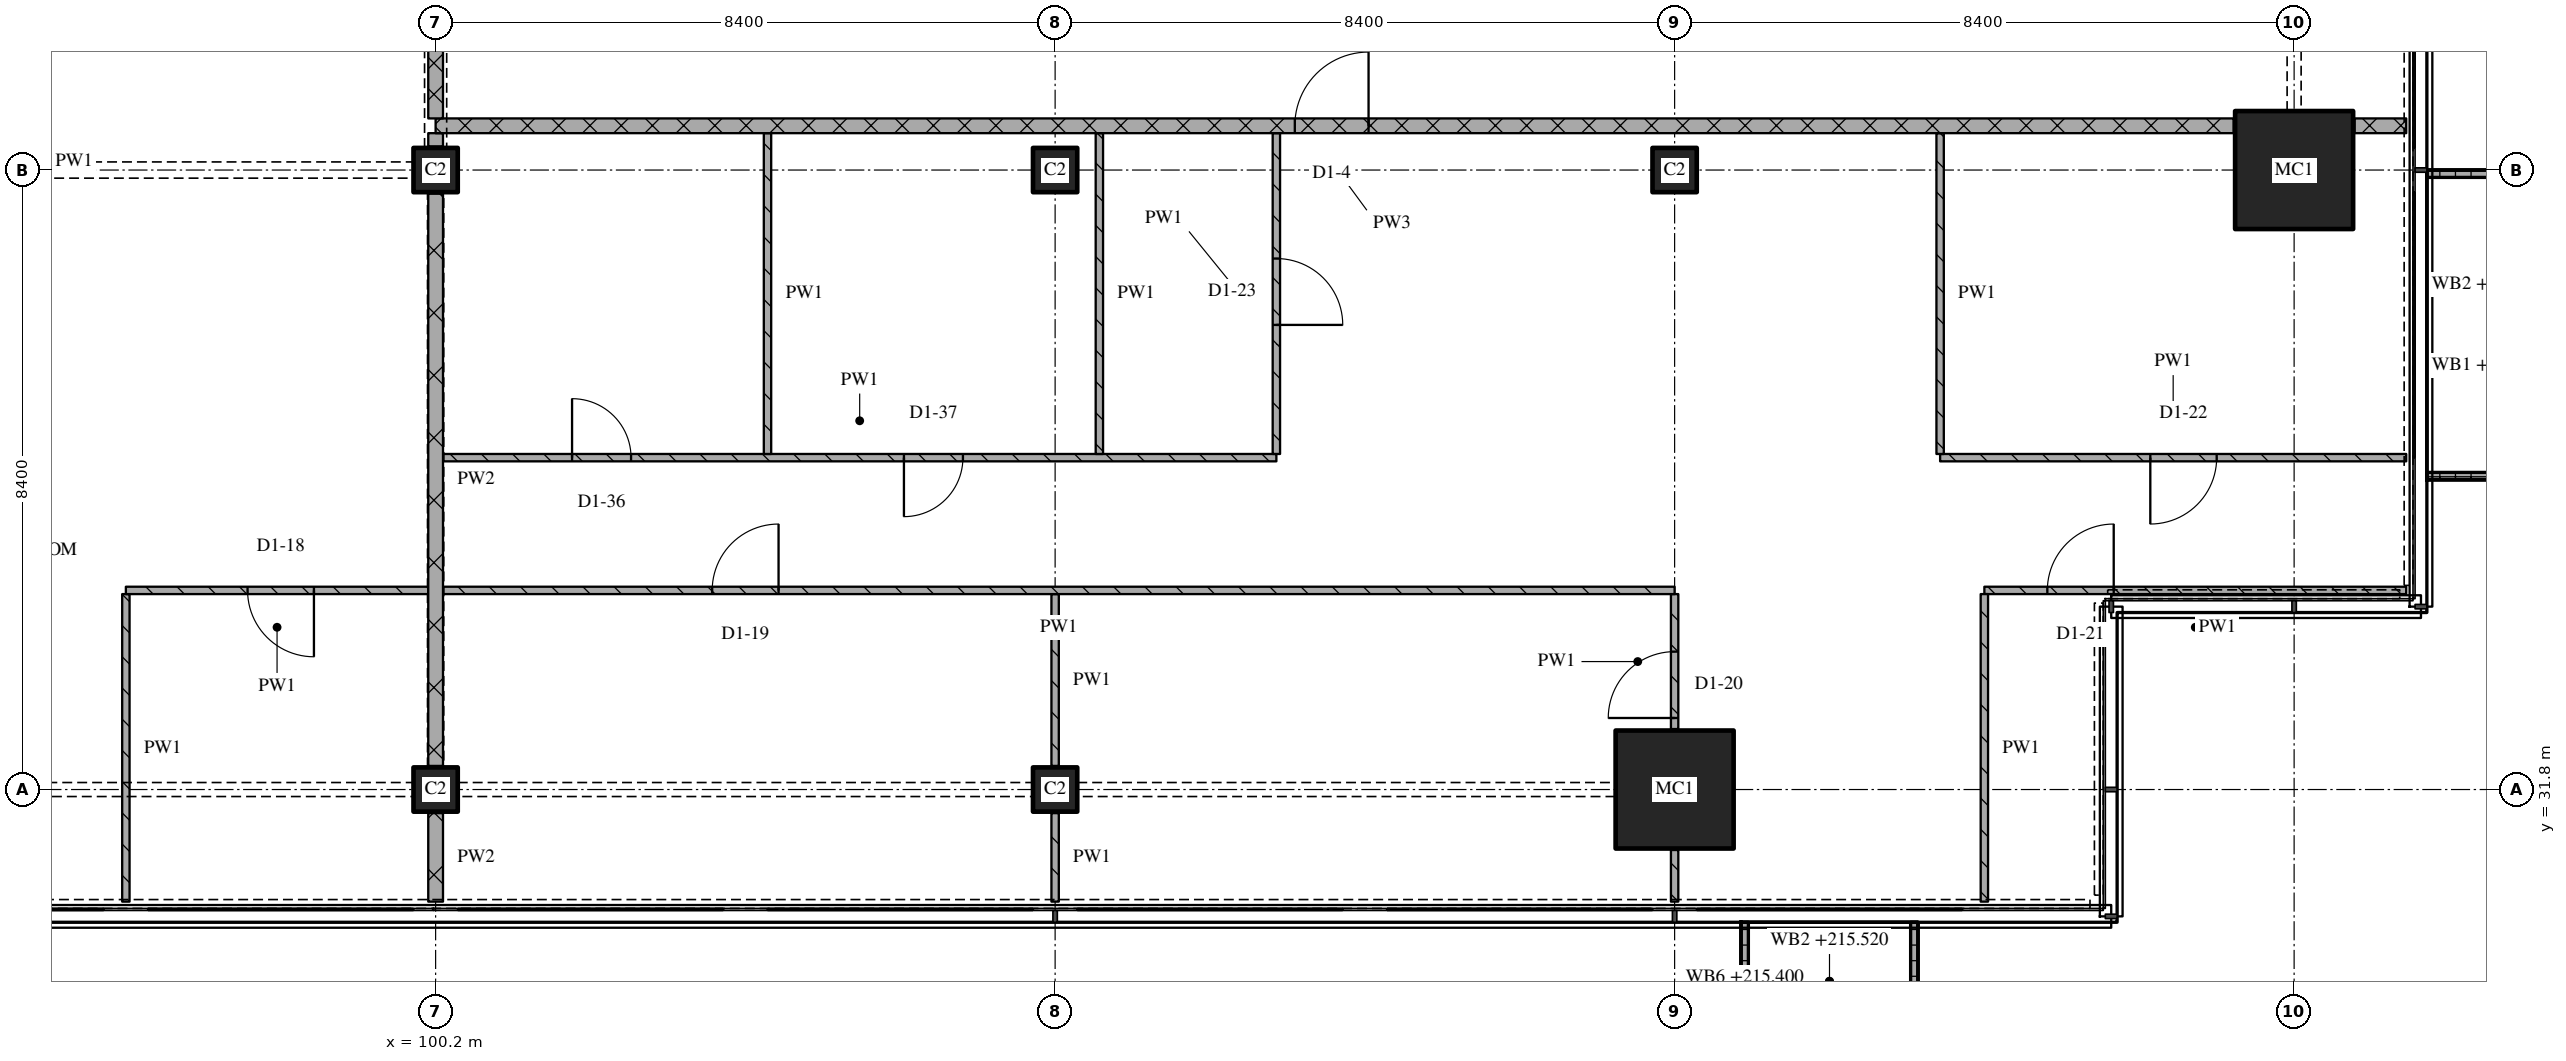
"""IFC4 building model, lengths in metres.
Left out: names, types, materials, properties, quantities, classifications, styles, units other than length and angle.
Written with IfcOpenShell. Run it as: python <this file> out.ifc"""

import sys

from ifc_helpers import new_model, si_unit, direction, frame, frame_2d, origin, origin_2d, place, context, subcontext, project, spatial, polyline, rectangle, outline, extrude, element, fill, save


model = new_model("IFC4")
c1 = context("Model", 3, precision=1e-05, world=origin(), true_north=direction((0.0, 1.0)))
c2 = subcontext(c1, "Body", "Model", "MODEL_VIEW")
j1 = project(units=[si_unit("LENGTHUNIT", "METRE"), si_unit("PLANEANGLEUNIT", "RADIAN")], contexts=[c1])
p1 = place(None, origin())
s1 = spatial("IfcSite", under=j1, at=p1, CompositionType="ELEMENT")
p2 = place(p1, origin())
s2 = spatial("IfcBuilding", under=s1, at=p2, CompositionType="ELEMENT")
p3 = place(p2, frame((0.0, 0.0, 212.7)))
s3 = spatial("IfcBuildingStorey", under=s2, at=p3, CompositionType="ELEMENT", Elevation=212.7)
for number, where, z_axis, x_axis in (
    (1, (100.2, 31.8, 0.0), (0.0, 0.0, 1.0), (1.0, 0.0, 0.0)),
    (2, (100.2, 40.2, 0.0), (0.0, 0.0, 1.0), (1.0, 0.0, 0.0)),
    (3, (108.6, 31.8, 0.0), (0.0, 0.0, 1.0), (1.0, 0.0, 0.0)),
    (4, (108.6, 40.2, 0.0), (0.0, 0.0, 1.0), (1.0, 0.0, 0.0)),
):
    element("IfcColumn", number, at=place(p3, frame(where, z_axis=z_axis, x_axis=x_axis)), inside=s3, PredefinedType="COLUMN", context=c2, shape_type="SweptSolid", body=[
        extrude(rectangle(XDim=0.6, YDim=0.6, at=origin_2d()), origin(), (0.0, 0.0, 1.0), 3.6),
    ])
p4 = place(p3, frame((117.0, 31.8, 0.0), z_axis=(0.0, 0.0, 1.0), x_axis=(1.0, 0.0, 0.0)))
e5 = element("IfcColumn", 5, at=p4, inside=s3, PredefinedType="COLUMN", context=c2, shape_type="SweptSolid", body=[
    extrude(rectangle(XDim=1.6, YDim=1.6, at=origin_2d()), origin(), (0.0, 0.0, 1.0), 3.6),
])
p5 = place(p3, frame((117.0, 40.2, 0.0), z_axis=(0.0, 0.0, 1.0), x_axis=(1.0, 0.0, 0.0)))
e6 = element("IfcColumn", 6, at=p5, inside=s3, PredefinedType="COLUMN", context=c2, shape_type="SweptSolid", body=[
    extrude(rectangle(XDim=0.6, YDim=0.6, at=origin_2d()), origin(), (0.0, 0.0, 1.0), 3.6),
])
p6 = place(p3, frame((125.4, 40.2, 0.0), z_axis=(0.0, 0.0, 1.0), x_axis=(1.0, 0.0, 0.0)))
e7 = element("IfcColumn", 7, at=p6, inside=s3, PredefinedType="COLUMN", context=c2, shape_type="SweptSolid", body=[
    extrude(rectangle(XDim=1.6, YDim=1.6, at=origin_2d()), origin(), (0.0, 0.0, 1.0), 3.6),
])
p7 = place(p3, origin())
e8 = element("IfcWall", 8, at=p7, inside=s3, PredefinedType="SOLIDWALL", context=c2, shape_type="SweptSolid", body=[
    extrude(outline(polyline([(117.9, 30.0), (118.0, 30.0), (118.0, 28.5), (120.2, 28.5), (120.2, 30.0), (120.3, 30.0), (120.3, 28.4), (117.9, 28.4), (117.9, 30.0)])), origin(), (0.0, 0.0, 1.0), 1.0),
])
p8 = place(p3, origin())
e9 = element("IfcWall", 9, at=p8, inside=s3, PredefinedType="SOLIDWALL", context=c2, shape_type="SweptSolid", body=[
    extrude(outline(polyline([(127.2, 36.0), (127.2, 36.1), (128.833, 36.1), (128.833, 40.1), (127.2, 40.1), (127.2, 40.2), (128.933, 40.2), (128.933, 36.0), (127.2, 36.0)])), origin(), (0.0, 0.0, 1.0), 1.0),
])
p9 = place(p3, frame((126.92, 34.5, 0.0), z_axis=(0.0, 0.0, 1.0), x_axis=(-1.0, 0.0, 0.0)))
e10 = element("IfcWall", 10, at=p9, inside=s3, PredefinedType="PARTITIONING", context=c2, shape_type="SweptSolid", body=[
    extrude(rectangle(XDim=5.72, YDim=0.1, at=frame_2d((2.86, 0.0))), origin(), (0.0, 0.0, 1.0), 3.32),
])
p10 = place(p9, frame((3.966, 0.0, 0.0)))
e11 = element("IfcOpeningElement", 11, at=p10, cuts=e10, PredefinedType="OPENING", context=c2, shape_type="SweptSolid", body=[
    extrude(rectangle(XDim=0.9, YDim=2.1, at=frame_2d((0.45, 1.05))), frame((0.0, 0.06, 0.0), z_axis=(0.0, -1.0, 0.0), x_axis=(1.0, 0.0, 0.0)), (0.0, 0.0, 1.0), 0.12),
])
p11 = place(p3, frame((100.3, 36.3, 0.0), z_axis=(0.0, 0.0, 1.0), x_axis=(1.0, 0.0, 0.0)))
e12 = element("IfcWall", 12, at=p11, inside=s3, PredefinedType="PARTITIONING", context=c2, shape_type="SweptSolid", body=[
    extrude(rectangle(XDim=11.3, YDim=0.1, at=frame_2d((5.65, 0.0))), origin(), (0.0, 0.0, 1.0), 3.32),
])
p12 = place(p11, frame((1.75, 0.0, 0.0)))
e13 = element("IfcOpeningElement", 13, at=p12, cuts=e12, PredefinedType="OPENING", context=c2, shape_type="SweptSolid", body=[
    extrude(rectangle(XDim=0.8, YDim=2.1, at=frame_2d((0.4, 1.05))), frame((0.0, 0.06, 0.0), z_axis=(0.0, -1.0, 0.0), x_axis=(1.0, 0.0, 0.0)), (0.0, 0.0, 1.0), 0.12),
])
p13 = place(p11, frame((6.25, 0.0, 0.0)))
e14 = element("IfcOpeningElement", 14, at=p13, cuts=e12, PredefinedType="OPENING", context=c2, shape_type="SweptSolid", body=[
    extrude(rectangle(XDim=0.8, YDim=2.1, at=frame_2d((0.4, 1.05))), frame((0.0, 0.06, 0.0), z_axis=(0.0, -1.0, 0.0), x_axis=(1.0, 0.0, 0.0)), (0.0, 0.0, 1.0), 0.12),
])
p14 = place(p3, frame((120.6, 36.3, 0.0), z_axis=(0.0, 0.0, 1.0), x_axis=(1.0, 0.0, 0.0)))
e15 = element("IfcWall", 15, at=p14, inside=s3, PredefinedType="PARTITIONING", context=c2, shape_type="SweptSolid", body=[
    extrude(rectangle(XDim=6.32, YDim=0.1, at=frame_2d((3.16, 0.0))), origin(), (0.0, 0.0, 1.0), 3.32),
])
p15 = place(p14, frame((2.85, 0.0, 0.0)))
e16 = element("IfcOpeningElement", 16, at=p15, cuts=e15, PredefinedType="OPENING", context=c2, shape_type="SweptSolid", body=[
    extrude(rectangle(XDim=0.9, YDim=2.1, at=frame_2d((0.45, 1.05))), frame((0.0, 0.06, 0.0), z_axis=(0.0, -1.0, 0.0), x_axis=(1.0, 0.0, 0.0)), (0.0, 0.0, 1.0), 0.12),
])
p16 = place(p3, frame((124.58, 40.8, 0.0), z_axis=(0.0, 0.0, 1.0), x_axis=(-1.0, 0.0, 0.0)))
e17 = element("IfcWall", 17, at=p16, inside=s3, PredefinedType="PARTITIONING", context=c2, shape_type="SweptSolid", body=[
    extrude(rectangle(XDim=24.38, YDim=0.2, at=frame_2d((12.19, 0.0))), origin(), (0.0, 0.0, 1.0), 3.32),
])
p17 = place(p16, frame((11.73, 0.0, 0.0)))
e18 = element("IfcOpeningElement", 18, at=p17, cuts=e17, PredefinedType="OPENING", context=c2, shape_type="SweptSolid", body=[
    extrude(rectangle(XDim=1.0, YDim=2.1, at=frame_2d((0.5, 1.05))), frame((0.0, 0.11, 0.0), z_axis=(0.0, -1.0, 0.0), x_axis=(1.0, 0.0, 0.0)), (0.0, 0.0, 1.0), 0.22),
])
p18 = place(p3, frame((126.22, 40.8, 0.0), z_axis=(0.0, 0.0, 1.0), x_axis=(1.0, 0.0, 0.0)))
e19 = element("IfcWall", 19, at=p18, inside=s3, PredefinedType="PARTITIONING", context=c2, shape_type="SweptSolid", body=[
    extrude(rectangle(XDim=0.7, YDim=0.2, at=frame_2d((0.35, 0.0))), origin(), (0.0, 0.0, 1.0), 3.32),
])
p19 = place(p3, frame((96.0, 34.45, 0.0), z_axis=(0.0, 0.0, 1.0), x_axis=(0.0, -1.0, 0.0)))
e20 = element("IfcWall", 20, at=p19, inside=s3, PredefinedType="PARTITIONING", context=c2, shape_type="SweptSolid", body=[
    extrude(rectangle(XDim=4.17, YDim=0.1, at=frame_2d((2.085, 0.0))), origin(), (0.0, 0.0, 1.0), 3.32),
])
p20 = place(p3, frame((100.2, 43.1, 0.0), z_axis=(0.0, 0.0, 1.0), x_axis=(0.0, -1.0, 0.0)))
e21 = element("IfcWall", 21, at=p20, inside=s3, PredefinedType="PARTITIONING", context=c2, shape_type="SweptSolid", body=[
    extrude(rectangle(XDim=2.2, YDim=0.2, at=frame_2d((1.1, 0.0))), origin(), (0.0, 0.0, 1.0), 2.53),
])
p21 = place(p3, frame((100.2, 31.48, 0.0), z_axis=(0.0, 0.0, 1.0), x_axis=(0.0, -1.0, 0.0)))
e22 = element("IfcWall", 22, at=p21, inside=s3, PredefinedType="PARTITIONING", context=c2, shape_type="SweptSolid", body=[
    extrude(rectangle(XDim=1.2, YDim=0.2, at=frame_2d((0.6, 0.0))), origin(), (0.0, 0.0, 1.0), 3.32),
])
p22 = place(p3, frame((100.2, 39.88, 0.0), z_axis=(0.0, 0.0, 1.0), x_axis=(0.0, -1.0, 0.0)))
e23 = element("IfcWall", 23, at=p22, inside=s3, PredefinedType="PARTITIONING", context=c2, shape_type="SweptSolid", body=[
    extrude(rectangle(XDim=7.76, YDim=0.2, at=frame_2d((3.88, 0.0))), origin(), (0.0, 0.0, 1.0), 2.72),
])
p23 = place(p3, frame((100.2, 40.7, 0.0), z_axis=(0.0, 0.0, 1.0), x_axis=(0.0, -1.0, 0.0)))
e24 = element("IfcWall", 24, at=p23, inside=s3, PredefinedType="PARTITIONING", context=c2, shape_type="SweptSolid", body=[
    extrude(rectangle(XDim=0.18, YDim=0.2, at=frame_2d((0.09, 0.0))), origin(), (0.0, 0.0, 1.0), 3.32),
])
p24 = place(p3, frame((104.7, 40.7, 0.0), z_axis=(0.0, 0.0, 1.0), x_axis=(0.0, -1.0, 0.0)))
e25 = element("IfcWall", 25, at=p24, inside=s3, PredefinedType="PARTITIONING", context=c2, shape_type="SweptSolid", body=[
    extrude(rectangle(XDim=4.35, YDim=0.1, at=frame_2d((2.175, 0.0))), origin(), (0.0, 0.0, 1.0), 3.32),
])
p25 = place(p3, frame((108.6, 31.48, 0.0), z_axis=(0.0, 0.0, 1.0), x_axis=(0.0, -1.0, 0.0)))
e26 = element("IfcWall", 26, at=p25, inside=s3, PredefinedType="PARTITIONING", context=c2, shape_type="SweptSolid", body=[
    extrude(rectangle(XDim=1.2, YDim=0.1, at=frame_2d((0.6, 0.0))), origin(), (0.0, 0.0, 1.0), 3.32),
])
p26 = place(p3, frame((108.6, 34.45, 0.0), z_axis=(0.0, 0.0, 1.0), x_axis=(0.0, -1.0, 0.0)))
e27 = element("IfcWall", 27, at=p26, inside=s3, PredefinedType="PARTITIONING", context=c2, shape_type="SweptSolid", body=[
    extrude(rectangle(XDim=2.33, YDim=0.1, at=frame_2d((1.165, 0.0))), origin(), (0.0, 0.0, 1.0), 3.32),
])
p27 = place(p3, frame((109.2, 40.7, 0.0), z_axis=(0.0, 0.0, 1.0), x_axis=(0.0, -1.0, 0.0)))
e28 = element("IfcWall", 28, at=p27, inside=s3, PredefinedType="PARTITIONING", context=c2, shape_type="SweptSolid", body=[
    extrude(rectangle(XDim=4.35, YDim=0.1, at=frame_2d((2.175, 0.0))), origin(), (0.0, 0.0, 1.0), 3.32),
])
p28 = place(p3, frame((111.6, 36.35, 0.0), z_axis=(0.0, 0.0, 1.0), x_axis=(0.0, 1.0, 0.0)))
e29 = element("IfcWall", 29, at=p28, inside=s3, PredefinedType="PARTITIONING", context=c2, shape_type="SweptSolid", body=[
    extrude(rectangle(XDim=4.35, YDim=0.1, at=frame_2d((2.175, 0.0))), origin(), (0.0, 0.0, 1.0), 3.32),
])
p29 = place(p28, frame((1.75, 0.0, 0.0)))
e30 = element("IfcOpeningElement", 30, at=p29, cuts=e29, PredefinedType="OPENING", context=c2, shape_type="SweptSolid", body=[
    extrude(rectangle(XDim=0.9, YDim=2.1, at=frame_2d((0.45, 1.05))), frame((0.0, 0.06, 0.0), z_axis=(0.0, -1.0, 0.0), x_axis=(1.0, 0.0, 0.0)), (0.0, 0.0, 1.0), 0.12),
])
p30 = place(p3, frame((117.0, 30.98, 0.0), z_axis=(0.0, 0.0, 1.0), x_axis=(0.0, -1.0, 0.0)))
e31 = element("IfcWall", 31, at=p30, inside=s3, PredefinedType="PARTITIONING", context=c2, shape_type="SweptSolid", body=[
    extrude(rectangle(XDim=0.7, YDim=0.1, at=frame_2d((0.35, 0.0))), origin(), (0.0, 0.0, 1.0), 3.32),
])
p31 = place(p3, frame((117.0, 32.62, 0.0), z_axis=(0.0, 0.0, 1.0), x_axis=(0.0, 1.0, 0.0)))
e32 = element("IfcWall", 32, at=p31, inside=s3, PredefinedType="PARTITIONING", context=c2, shape_type="SweptSolid", body=[
    extrude(rectangle(XDim=1.83, YDim=0.1, at=frame_2d((0.915, 0.0))), origin(), (0.0, 0.0, 1.0), 3.32),
])
p32 = place(p31, frame((0.15, 0.0, 0.0)))
e33 = element("IfcOpeningElement", 33, at=p32, cuts=e32, PredefinedType="OPENING", context=c2, shape_type="SweptSolid", body=[
    extrude(rectangle(XDim=0.9, YDim=2.1, at=frame_2d((0.45, 1.05))), frame((0.0, 0.06, 0.0), z_axis=(0.0, -1.0, 0.0), x_axis=(1.0, 0.0, 0.0)), (0.0, 0.0, 1.0), 0.12),
])
p33 = place(p3, frame((120.6, 40.7, 0.0), z_axis=(0.0, 0.0, 1.0), x_axis=(0.0, -1.0, 0.0)))
e34 = element("IfcWall", 34, at=p33, inside=s3, PredefinedType="PARTITIONING", context=c2, shape_type="SweptSolid", body=[
    extrude(rectangle(XDim=4.35, YDim=0.1, at=frame_2d((2.175, 0.0))), origin(), (0.0, 0.0, 1.0), 3.32),
])
p34 = place(p3, frame((121.2, 34.45, 0.0), z_axis=(0.0, 0.0, 1.0), x_axis=(0.0, -1.0, 0.0)))
e35 = element("IfcWall", 35, at=p34, inside=s3, PredefinedType="PARTITIONING", context=c2, shape_type="SweptSolid", body=[
    extrude(rectangle(XDim=4.17, YDim=0.1, at=frame_2d((2.085, 0.0))), origin(), (0.0, 0.0, 1.0), 3.32),
])
p35 = place(p3, frame((100.1, 34.5, 0.0), z_axis=(0.0, 0.0, 1.0), x_axis=(-1.0, 0.0, 0.0)))
e36 = element("IfcWall", 36, at=p35, inside=s3, PredefinedType="PARTITIONING", context=c2, shape_type="SweptSolid", body=[
    extrude(rectangle(XDim=4.1, YDim=0.1, at=frame_2d((2.05, 0.0))), origin(), (0.0, 0.0, 1.0), 3.32),
])
p36 = place(p35, frame((1.55, 0.0, 0.0)))
e37 = element("IfcOpeningElement", 37, at=p36, cuts=e36, PredefinedType="OPENING", context=c2, shape_type="SweptSolid", body=[
    extrude(rectangle(XDim=0.9, YDim=2.1, at=frame_2d((0.45, 1.05))), frame((0.0, 0.06, 0.0), z_axis=(0.0, -1.0, 0.0), x_axis=(1.0, 0.0, 0.0)), (0.0, 0.0, 1.0), 0.12),
])
p37 = place(p3, frame((117.0, 34.5, 0.0), z_axis=(0.0, 0.0, 1.0), x_axis=(-1.0, 0.0, 0.0)))
e38 = element("IfcWall", 38, at=p37, inside=s3, PredefinedType="PARTITIONING", context=c2, shape_type="SweptSolid", body=[
    extrude(rectangle(XDim=16.7, YDim=0.1, at=frame_2d((8.35, 0.0))), origin(), (0.0, 0.0, 1.0), 3.32),
])
p38 = place(p37, frame((12.15, 0.0, 0.0)))
e39 = element("IfcOpeningElement", 39, at=p38, cuts=e38, PredefinedType="OPENING", context=c2, shape_type="SweptSolid", body=[
    extrude(rectangle(XDim=0.9, YDim=2.1, at=frame_2d((0.45, 1.05))), frame((0.0, 0.06, 0.0), z_axis=(0.0, -1.0, 0.0), x_axis=(1.0, 0.0, 0.0)), (0.0, 0.0, 1.0), 0.12),
])
p39 = place(p10, origin())
e40 = element("IfcDoor", 40, at=p39, inside=s3, OperationType="SINGLE_SWING_RIGHT", PredefinedType="DOOR", context=c2, shape_type="SweptSolid", body=[
    extrude(rectangle(XDim=0.9, YDim=2.1, at=frame_2d((0.45, 1.05))), frame((0.0, 0.025, 0.0), z_axis=(0.0, -1.0, 0.0), x_axis=(1.0, 0.0, 0.0)), (0.0, 0.0, 1.0), 0.05),
])
fill(e11, e40)
p40 = place(p12, origin())
e41 = element("IfcDoor", 41, at=p40, inside=s3, OperationType="SINGLE_SWING_LEFT", PredefinedType="DOOR", context=c2, shape_type="SweptSolid", body=[
    extrude(rectangle(XDim=0.8, YDim=2.1, at=frame_2d((0.4, 1.05))), frame((0.0, 0.025, 0.0), z_axis=(0.0, -1.0, 0.0), x_axis=(1.0, 0.0, 0.0)), (0.0, 0.0, 1.0), 0.05),
])
fill(e13, e41)
p41 = place(p13, origin())
e42 = element("IfcDoor", 42, at=p41, inside=s3, OperationType="SINGLE_SWING_RIGHT", PredefinedType="DOOR", context=c2, shape_type="SweptSolid", body=[
    extrude(rectangle(XDim=0.8, YDim=2.1, at=frame_2d((0.4, 1.05))), frame((0.0, 0.025, 0.0), z_axis=(0.0, -1.0, 0.0), x_axis=(1.0, 0.0, 0.0)), (0.0, 0.0, 1.0), 0.05),
])
fill(e14, e42)
p42 = place(p15, origin())
e43 = element("IfcDoor", 43, at=p42, inside=s3, OperationType="SINGLE_SWING_RIGHT", PredefinedType="DOOR", context=c2, shape_type="SweptSolid", body=[
    extrude(rectangle(XDim=0.9, YDim=2.1, at=frame_2d((0.45, 1.05))), frame((0.0, 0.025, 0.0), z_axis=(0.0, -1.0, 0.0), x_axis=(1.0, 0.0, 0.0)), (0.0, 0.0, 1.0), 0.05),
])
fill(e16, e43)
p43 = place(p17, origin())
e44 = element("IfcDoor", 44, at=p43, inside=s3, OperationType="SINGLE_SWING_RIGHT", PredefinedType="DOOR", context=c2, shape_type="SweptSolid", body=[
    extrude(rectangle(XDim=1.0, YDim=2.1, at=frame_2d((0.5, 1.05))), frame((0.0, 0.025, 0.0), z_axis=(0.0, -1.0, 0.0), x_axis=(1.0, 0.0, 0.0)), (0.0, 0.0, 1.0), 0.05),
])
fill(e18, e44)
p44 = place(p29, origin())
e45 = element("IfcDoor", 45, at=p44, inside=s3, OperationType="SINGLE_SWING_RIGHT", PredefinedType="DOOR", context=c2, shape_type="SweptSolid", body=[
    extrude(rectangle(XDim=0.9, YDim=2.1, at=frame_2d((0.45, 1.05))), frame((0.0, 0.025, 0.0), z_axis=(0.0, -1.0, 0.0), x_axis=(1.0, 0.0, 0.0)), (0.0, 0.0, 1.0), 0.05),
])
fill(e30, e45)
p45 = place(p32, origin())
e46 = element("IfcDoor", 46, at=p45, inside=s3, OperationType="SINGLE_SWING_LEFT", PredefinedType="DOOR", context=c2, shape_type="SweptSolid", body=[
    extrude(rectangle(XDim=0.9, YDim=2.1, at=frame_2d((0.45, 1.05))), frame((0.0, 0.025, 0.0), z_axis=(0.0, -1.0, 0.0), x_axis=(1.0, 0.0, 0.0)), (0.0, 0.0, 1.0), 0.05),
])
fill(e33, e46)
p46 = place(p36, origin())
e47 = element("IfcDoor", 47, at=p46, inside=s3, OperationType="SINGLE_SWING_LEFT", PredefinedType="DOOR", context=c2, shape_type="SweptSolid", body=[
    extrude(rectangle(XDim=0.9, YDim=2.1, at=frame_2d((0.45, 1.05))), frame((0.0, 0.025, 0.0), z_axis=(0.0, -1.0, 0.0), x_axis=(1.0, 0.0, 0.0)), (0.0, 0.0, 1.0), 0.05),
])
fill(e37, e47)
p47 = place(p38, origin())
e48 = element("IfcDoor", 48, at=p47, inside=s3, OperationType="SINGLE_SWING_RIGHT", PredefinedType="DOOR", context=c2, shape_type="SweptSolid", body=[
    extrude(rectangle(XDim=0.9, YDim=2.1, at=frame_2d((0.45, 1.05))), frame((0.0, 0.025, 0.0), z_axis=(0.0, -1.0, 0.0), x_axis=(1.0, 0.0, 0.0)), (0.0, 0.0, 1.0), 0.05),
])
fill(e39, e48)
save(model, sys.argv[1])
